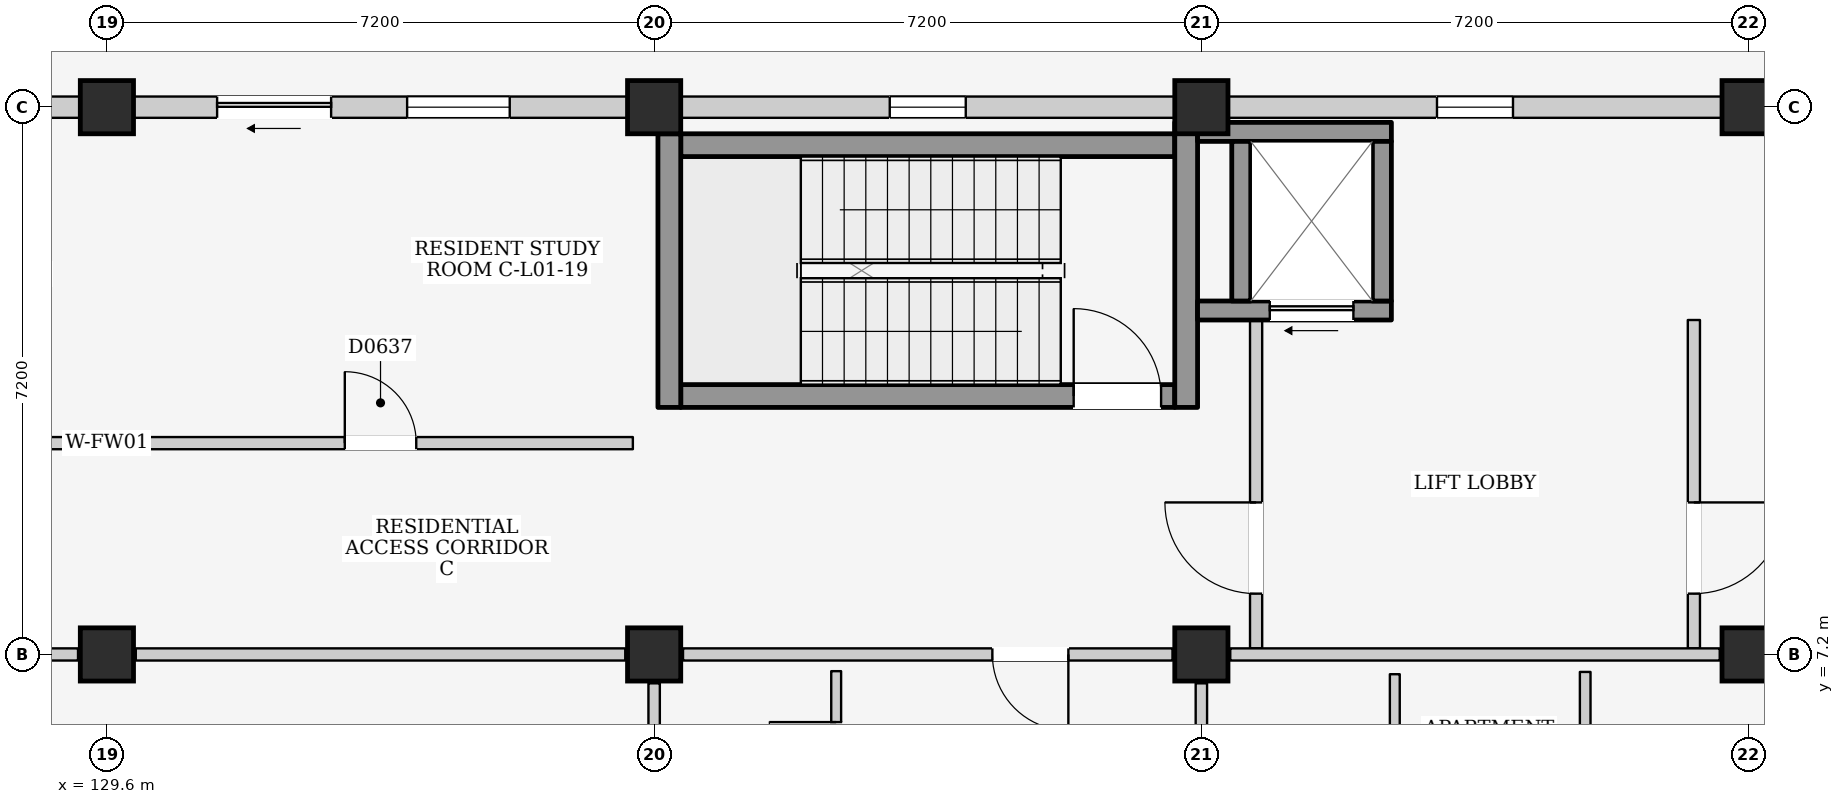
"""IFC4 building model, lengths in metres.
Left out: names, types, materials, properties, quantities, classifications, styles, units other than length and angle.
Written with IfcOpenShell. Run it as: python <this file> out.ifc"""

import sys

from ifc_helpers import new_model, si_unit, direction, frame, frame_2d, origin, origin_2d, place, context, subcontext, project, spatial, rectangle, extrude, element, fill, save


model = new_model("IFC4")
c1 = context("Model", 3, precision=1e-05, world=origin(), true_north=direction((0.0, 1.0)))
c2 = subcontext(c1, "Body", "Model", "MODEL_VIEW")
j1 = project(units=[si_unit("LENGTHUNIT", "METRE"), si_unit("PLANEANGLEUNIT", "RADIAN")], contexts=[c1])
p1 = place(None, origin())
s1 = spatial("IfcSite", under=j1, at=p1, CompositionType="ELEMENT")
p2 = place(p1, origin())
s2 = spatial("IfcBuilding", under=s1, at=p2, CompositionType="ELEMENT")
p3 = place(p2, frame((0.0, 0.0, 4.5)))
s3 = spatial("IfcBuildingStorey", under=s2, at=p3, CompositionType="ELEMENT", Elevation=4.5)
for number, where, z_axis, x_axis in (
    (1, (129.6, 7.2, 0.0), (0.0, 0.0, 1.0), (1.0, 0.0, 0.0)),
    (2, (129.6, 14.4, 0.0), (0.0, 0.0, 1.0), (1.0, 0.0, 0.0)),
    (3, (136.8, 7.2, 0.0), (0.0, 0.0, 1.0), (1.0, 0.0, 0.0)),
    (4, (136.8, 14.4, 0.0), (0.0, 0.0, 1.0), (1.0, 0.0, 0.0)),
    (5, (144.0, 7.2, 0.0), (0.0, 0.0, 1.0), (1.0, 0.0, 0.0)),
    (6, (144.0, 14.4, 0.0), (0.0, 0.0, 1.0), (1.0, 0.0, 0.0)),
    (7, (151.2, 7.2, 0.0), (0.0, 0.0, 1.0), (1.0, 0.0, 0.0)),
    (8, (151.2, 14.4, 0.0), (0.0, 0.0, 1.0), (1.0, 0.0, 0.0)),
):
    element("IfcColumn", number, at=place(p3, frame(where, z_axis=z_axis, x_axis=x_axis)), inside=s3, PredefinedType="COLUMN", context=c2, shape_type="SweptSolid", body=[
        extrude(rectangle(XDim=0.7, YDim=0.7, at=origin_2d()), origin(), (0.0, 0.0, 1.0), 4.5),
    ])
p4 = place(p3, frame((122.75, 14.4, 0.0), z_axis=(0.0, 0.0, 1.0), x_axis=(1.0, 0.0, 0.0)))
e9 = element("IfcWall", 9, at=p4, inside=s3, PredefinedType="ELEMENTEDWALL", context=c2, shape_type="SweptSolid", body=[
    extrude(rectangle(XDim=6.5, YDim=0.28, at=frame_2d((3.25, 0.0))), origin(), (0.0, 0.0, 1.0), 3.635),
])
p5 = place(p4, frame((1.1, 0.0, 0.0)))
e10 = element("IfcOpeningElement", 10, at=p5, cuts=e9, PredefinedType="OPENING", context=c2, shape_type="SweptSolid", body=[
    extrude(rectangle(XDim=1.5, YDim=2.12, at=frame_2d((0.75, 1.06))), frame((0.0, 0.155, 0.0), z_axis=(0.0, -1.0, 0.0), x_axis=(1.0, 0.0, 0.0)), (0.0, 0.0, 1.0), 0.31),
])
p6 = place(p4, frame((3.6, 0.0, 0.95)))
e11 = element("IfcOpeningElement", 11, at=p6, cuts=e9, PredefinedType="OPENING", context=c2, shape_type="SweptSolid", body=[
    extrude(rectangle(XDim=1.35, YDim=1.5, at=frame_2d((0.675, 0.75))), frame((0.0, 0.155, 0.0), z_axis=(0.0, -1.0, 0.0), x_axis=(1.0, 0.0, 0.0)), (0.0, 0.0, 1.0), 0.31),
])
p7 = place(p3, frame((129.95, 14.4, 0.0), z_axis=(0.0, 0.0, 1.0), x_axis=(1.0, 0.0, 0.0)))
e12 = element("IfcWall", 12, at=p7, inside=s3, PredefinedType="ELEMENTEDWALL", context=c2, shape_type="SweptSolid", body=[
    extrude(rectangle(XDim=6.5, YDim=0.28, at=frame_2d((3.25, 0.0))), origin(), (0.0, 0.0, 1.0), 3.635),
])
p8 = place(p7, frame((1.1, 0.0, 0.0)))
e13 = element("IfcOpeningElement", 13, at=p8, cuts=e12, PredefinedType="OPENING", context=c2, shape_type="SweptSolid", body=[
    extrude(rectangle(XDim=1.5, YDim=2.12, at=frame_2d((0.75, 1.06))), frame((0.0, 0.155, 0.0), z_axis=(0.0, -1.0, 0.0), x_axis=(1.0, 0.0, 0.0)), (0.0, 0.0, 1.0), 0.31),
])
p9 = place(p7, frame((3.6, 0.0, 0.95)))
e14 = element("IfcOpeningElement", 14, at=p9, cuts=e12, PredefinedType="OPENING", context=c2, shape_type="SweptSolid", body=[
    extrude(rectangle(XDim=1.35, YDim=1.5, at=frame_2d((0.675, 0.75))), frame((0.0, 0.155, 0.0), z_axis=(0.0, -1.0, 0.0), x_axis=(1.0, 0.0, 0.0)), (0.0, 0.0, 1.0), 0.31),
])
p10 = place(p3, frame((137.15, 14.4, 0.0), z_axis=(0.0, 0.0, 1.0), x_axis=(1.0, 0.0, 0.0)))
e15 = element("IfcWall", 15, at=p10, inside=s3, PredefinedType="ELEMENTEDWALL", context=c2, shape_type="SweptSolid", body=[
    extrude(rectangle(XDim=6.5, YDim=0.28, at=frame_2d((3.25, 0.0))), origin(), (0.0, 0.0, 1.0), 3.635),
])
p11 = place(p10, frame((2.75, 0.0, 1.2)))
e16 = element("IfcOpeningElement", 16, at=p11, cuts=e15, PredefinedType="OPENING", context=c2, shape_type="SweptSolid", body=[
    extrude(rectangle(XDim=1.0, YDim=0.9, at=frame_2d((0.5, 0.45))), frame((0.0, 0.155, 0.0), z_axis=(0.0, -1.0, 0.0), x_axis=(1.0, 0.0, 0.0)), (0.0, 0.0, 1.0), 0.31),
])
p12 = place(p3, frame((144.35, 14.4, 0.0), z_axis=(0.0, 0.0, 1.0), x_axis=(1.0, 0.0, 0.0)))
e17 = element("IfcWall", 17, at=p12, inside=s3, PredefinedType="ELEMENTEDWALL", context=c2, shape_type="SweptSolid", body=[
    extrude(rectangle(XDim=6.5, YDim=0.28, at=frame_2d((3.25, 0.0))), origin(), (0.0, 0.0, 1.0), 3.635),
])
p13 = place(p12, frame((2.75, 0.0, 1.2)))
e18 = element("IfcOpeningElement", 18, at=p13, cuts=e17, PredefinedType="OPENING", context=c2, shape_type="SweptSolid", body=[
    extrude(rectangle(XDim=1.0, YDim=0.9, at=frame_2d((0.5, 0.45))), frame((0.0, 0.155, 0.0), z_axis=(0.0, -1.0, 0.0), x_axis=(1.0, 0.0, 0.0)), (0.0, 0.0, 1.0), 0.31),
])
p14 = place(p3, frame((137.15, 10.6, 0.0), z_axis=(0.0, 0.0, 1.0), x_axis=(1.0, 0.0, 0.0)))
e19 = element("IfcWall", 19, at=p14, inside=s3, PredefinedType="SHEAR", context=c2, shape_type="SweptSolid", body=[
    extrude(rectangle(XDim=6.5, YDim=0.3, at=frame_2d((3.25, 0.0))), origin(), (0.0, 0.0, 1.0), 4.25),
])
p15 = place(p14, frame((5.17, 0.0, 0.0)))
e20 = element("IfcOpeningElement", 20, at=p15, cuts=e19, PredefinedType="OPENING", context=c2, shape_type="SweptSolid", body=[
    extrude(rectangle(XDim=1.15, YDim=2.2, at=frame_2d((0.575, 1.1))), frame((0.0, 0.165, 0.0), z_axis=(0.0, -1.0, 0.0), x_axis=(1.0, 0.0, 0.0)), (0.0, 0.0, 1.0), 0.33),
])
p16 = place(p3, frame((137.15, 13.9, 0.0), z_axis=(0.0, 0.0, 1.0), x_axis=(1.0, 0.0, 0.0)))
e21 = element("IfcWall", 21, at=p16, inside=s3, PredefinedType="SHEAR", context=c2, shape_type="SweptSolid", body=[
    extrude(rectangle(XDim=6.5, YDim=0.3, at=frame_2d((3.25, 0.0))), origin(), (0.0, 0.0, 1.0), 4.25),
])
p17 = place(p3, frame((137.0, 10.45, 0.0), z_axis=(0.0, 0.0, 1.0), x_axis=(0.0, 1.0, 0.0)))
e22 = element("IfcWall", 22, at=p17, inside=s3, PredefinedType="SHEAR", context=c2, shape_type="SweptSolid", body=[
    extrude(rectangle(XDim=3.6, YDim=0.3, at=frame_2d((1.8, 0.0))), origin(), (0.0, 0.0, 1.0), 4.25),
])
p18 = place(p3, frame((143.8, 10.45, 0.0), z_axis=(0.0, 0.0, 1.0), x_axis=(0.0, 1.0, 0.0)))
e23 = element("IfcWall", 23, at=p18, inside=s3, PredefinedType="SHEAR", context=c2, shape_type="SweptSolid", body=[
    extrude(rectangle(XDim=3.75, YDim=0.3, at=frame_2d((1.875, 0.0))), origin(), (0.0, 0.0, 1.0), 4.25),
])
p19 = place(p3, frame((144.72, 7.28, 0.0), z_axis=(0.0, 0.0, 1.0), x_axis=(0.0, 1.0, 0.0)))
e24 = element("IfcWall", 24, at=p19, inside=s3, PredefinedType="PARTITIONING", context=c2, shape_type="SweptSolid", body=[
    extrude(rectangle(XDim=4.32, YDim=0.16, at=frame_2d((2.16, 0.0))), origin(), (0.0, 0.0, 1.0), 4.25),
])
p20 = place(p19, frame((0.72, 0.0, 0.0)))
e25 = element("IfcOpeningElement", 25, at=p20, cuts=e24, PredefinedType="OPENING", context=c2, shape_type="SweptSolid", body=[
    extrude(rectangle(XDim=1.2, YDim=2.2, at=frame_2d((0.6, 1.1))), frame((0.0, 0.095, 0.0), z_axis=(0.0, -1.0, 0.0), x_axis=(1.0, 0.0, 0.0)), (0.0, 0.0, 1.0), 0.19),
])
p21 = place(p3, frame((150.48, 7.28, 0.0), z_axis=(0.0, 0.0, 1.0), x_axis=(0.0, 1.0, 0.0)))
e26 = element("IfcWall", 26, at=p21, inside=s3, PredefinedType="PARTITIONING", context=c2, shape_type="SweptSolid", body=[
    extrude(rectangle(XDim=4.32, YDim=0.16, at=frame_2d((2.16, 0.0))), origin(), (0.0, 0.0, 1.0), 4.25),
])
p22 = place(p21, frame((0.72, 0.0, 0.0)))
e27 = element("IfcOpeningElement", 27, at=p22, cuts=e26, PredefinedType="OPENING", context=c2, shape_type="SweptSolid", body=[
    extrude(rectangle(XDim=1.2, YDim=2.2, at=frame_2d((0.6, 1.1))), frame((0.0, 0.095, 0.0), z_axis=(0.0, -1.0, 0.0), x_axis=(1.0, 0.0, 0.0)), (0.0, 0.0, 1.0), 0.19),
])
p23 = place(p3, frame((143.95, 11.725, 0.0), z_axis=(0.0, 0.0, 1.0), x_axis=(1.0, 0.0, 0.0)))
e28 = element("IfcWall", 28, at=p23, inside=s3, PredefinedType="SHEAR", context=c2, shape_type="SweptSolid", body=[
    extrude(rectangle(XDim=2.55, YDim=0.25, at=frame_2d((1.275, 0.0))), origin(), (0.0, 0.0, 1.0), 4.25),
])
p24 = place(p23, frame((0.95, 0.0, 0.0)))
e29 = element("IfcOpeningElement", 29, at=p24, cuts=e28, PredefinedType="OPENING", context=c2, shape_type="SweptSolid", body=[
    extrude(rectangle(XDim=1.1, YDim=2.15, at=frame_2d((0.55, 1.075))), frame((0.0, 0.14, 0.0), z_axis=(0.0, -1.0, 0.0), x_axis=(1.0, 0.0, 0.0)), (0.0, 0.0, 1.0), 0.28),
])
p25 = place(p3, frame((143.95, 14.075, 0.0), z_axis=(0.0, 0.0, 1.0), x_axis=(1.0, 0.0, 0.0)))
e30 = element("IfcWall", 30, at=p25, inside=s3, PredefinedType="SHEAR", context=c2, shape_type="SweptSolid", body=[
    extrude(rectangle(XDim=2.55, YDim=0.25, at=frame_2d((1.275, 0.0))), origin(), (0.0, 0.0, 1.0), 4.25),
])
for number, where, z_axis, x_axis in (
    (31, (144.525, 11.85, 0.0), (0.0, 0.0, 1.0), (0.0, 1.0, 0.0)),
    (32, (146.375, 11.85, 0.0), (0.0, 0.0, 1.0), (0.0, 1.0, 0.0)),
):
    element("IfcWall", number, at=place(p3, frame(where, z_axis=z_axis, x_axis=x_axis)), inside=s3, PredefinedType="SHEAR", context=c2, shape_type="SweptSolid", body=[
        extrude(rectangle(XDim=2.1, YDim=0.25, at=frame_2d((1.05, 0.0))), origin(), (0.0, 0.0, 1.0), 4.25),
    ])
p26 = place(p3, frame((122.78, 7.2, 0.0), z_axis=(0.0, 0.0, 1.0), x_axis=(1.0, 0.0, 0.0)))
e33 = element("IfcWall", 33, at=p26, inside=s3, PredefinedType="PARTITIONING", context=c2, shape_type="SweptSolid", body=[
    extrude(rectangle(XDim=6.44, YDim=0.16, at=frame_2d((3.22, 0.0))), origin(), (0.0, 0.0, 1.0), 3.635),
])
p27 = place(p26, frame((4.045, 0.0, 0.0)))
e34 = element("IfcOpeningElement", 34, at=p27, cuts=e33, PredefinedType="OPENING", context=c2, shape_type="SweptSolid", body=[
    extrude(rectangle(XDim=1.05, YDim=2.2, at=frame_2d((0.525, 1.1))), frame((0.0, 0.095, 0.0), z_axis=(0.0, -1.0, 0.0), x_axis=(1.0, 0.0, 0.0)), (0.0, 0.0, 1.0), 0.19),
])
p28 = place(p3, frame((129.98, 7.2, 0.0), z_axis=(0.0, 0.0, 1.0), x_axis=(1.0, 0.0, 0.0)))
e35 = element("IfcWall", 35, at=p28, inside=s3, PredefinedType="PARTITIONING", context=c2, shape_type="SweptSolid", body=[
    extrude(rectangle(XDim=6.44, YDim=0.16, at=frame_2d((3.22, 0.0))), origin(), (0.0, 0.0, 1.0), 3.635),
])
p29 = place(p3, frame((136.8, 0.38, 0.0), z_axis=(0.0, 0.0, 1.0), x_axis=(0.0, 1.0, 0.0)))
e36 = element("IfcWall", 36, at=p29, inside=s3, PredefinedType="PARTITIONING", context=c2, shape_type="SweptSolid", body=[
    extrude(rectangle(XDim=6.44, YDim=0.15, at=frame_2d((3.22, 0.0))), origin(), (0.0, 0.0, 1.0), 3.685),
])
p30 = place(p3, frame((137.18, 7.2, 0.0), z_axis=(0.0, 0.0, 1.0), x_axis=(1.0, 0.0, 0.0)))
e37 = element("IfcWall", 37, at=p30, inside=s3, PredefinedType="PARTITIONING", context=c2, shape_type="SweptSolid", body=[
    extrude(rectangle(XDim=6.44, YDim=0.16, at=frame_2d((3.22, 0.0))), origin(), (0.0, 0.0, 1.0), 3.635),
])
p31 = place(p30, frame((4.07, 0.0, 0.0)))
e38 = element("IfcOpeningElement", 38, at=p31, cuts=e37, PredefinedType="OPENING", context=c2, shape_type="SweptSolid", body=[
    extrude(rectangle(XDim=1.0, YDim=2.15, at=frame_2d((0.5, 1.075))), frame((0.0, 0.095, 0.0), z_axis=(0.0, -1.0, 0.0), x_axis=(1.0, 0.0, 0.0)), (0.0, 0.0, 1.0), 0.19),
])
p32 = place(p3, frame((144.0, 0.38, 0.0), z_axis=(0.0, 0.0, 1.0), x_axis=(0.0, 1.0, 0.0)))
e39 = element("IfcWall", 39, at=p32, inside=s3, PredefinedType="PARTITIONING", context=c2, shape_type="SweptSolid", body=[
    extrude(rectangle(XDim=6.44, YDim=0.15, at=frame_2d((3.22, 0.0))), origin(), (0.0, 0.0, 1.0), 3.685),
])
p33 = place(p3, frame((139.195, 4.76, 0.0), z_axis=(0.0, 0.0, 1.0), x_axis=(0.0, 1.0, 0.0)))
e40 = element("IfcWall", 40, at=p33, inside=s3, PredefinedType="PARTITIONING", context=c2, shape_type="SweptSolid", body=[
    extrude(rectangle(XDim=2.22, YDim=0.13, at=frame_2d((1.11, 0.0))), origin(), (0.0, 0.0, 1.0), 4.25),
])
p34 = place(p33, frame((0.67, 0.0, 0.0)))
e41 = element("IfcOpeningElement", 41, at=p34, cuts=e40, PredefinedType="OPENING", context=c2, shape_type="SweptSolid", body=[
    extrude(rectangle(XDim=0.88, YDim=2.1, at=frame_2d((0.44, 1.05))), frame((0.0, 0.08, 0.0), z_axis=(0.0, -1.0, 0.0), x_axis=(1.0, 0.0, 0.0)), (0.0, 0.0, 1.0), 0.16),
])
p35 = place(p3, frame((144.38, 7.2, 0.0), z_axis=(0.0, 0.0, 1.0), x_axis=(1.0, 0.0, 0.0)))
e42 = element("IfcWall", 42, at=p35, inside=s3, PredefinedType="PARTITIONING", context=c2, shape_type="SweptSolid", body=[
    extrude(rectangle(XDim=6.44, YDim=0.16, at=frame_2d((3.22, 0.0))), origin(), (0.0, 0.0, 1.0), 3.635),
])
p36 = place(p3, frame((146.545, 3.9, 0.0), z_axis=(0.0, 0.0, 1.0), x_axis=(0.0, 1.0, 0.0)))
e43 = element("IfcWall", 43, at=p36, inside=s3, PredefinedType="PARTITIONING", context=c2, shape_type="SweptSolid", body=[
    extrude(rectangle(XDim=3.04, YDim=0.13, at=frame_2d((1.52, 0.0))), origin(), (0.0, 0.0, 1.0), 4.25),
])
p37 = place(p3, frame((149.05, 3.91, 0.0), z_axis=(0.0, 0.0, 1.0), x_axis=(0.0, 1.0, 0.0)))
e44 = element("IfcWall", 44, at=p37, inside=s3, PredefinedType="PARTITIONING", context=c2, shape_type="SweptSolid", body=[
    extrude(rectangle(XDim=3.06, YDim=0.14, at=frame_2d((1.53, 0.0))), origin(), (0.0, 0.0, 1.0), 4.25),
])
p38 = place(p3, frame((122.68, 9.98, 0.0), z_axis=(0.0, 0.0, 1.0), x_axis=(1.0, 0.0, 0.0)))
e45 = element("IfcWall", 45, at=p38, inside=s3, PredefinedType="PARTITIONING", context=c2, shape_type="SweptSolid", body=[
    extrude(rectangle(XDim=6.64, YDim=0.16, at=frame_2d((3.32, 0.0))), origin(), (0.0, 0.0, 1.0), 4.25),
])
p39 = place(p38, frame((2.85, 0.0, 0.0)))
e46 = element("IfcOpeningElement", 46, at=p39, cuts=e45, PredefinedType="OPENING", context=c2, shape_type="SweptSolid", body=[
    extrude(rectangle(XDim=0.94, YDim=2.12, at=frame_2d((0.47, 1.06))), frame((0.0, 0.095, 0.0), z_axis=(0.0, -1.0, 0.0), x_axis=(1.0, 0.0, 0.0)), (0.0, 0.0, 1.0), 0.19),
])
p40 = place(p3, frame((129.88, 9.98, 0.0), z_axis=(0.0, 0.0, 1.0), x_axis=(1.0, 0.0, 0.0)))
e47 = element("IfcWall", 47, at=p40, inside=s3, PredefinedType="PARTITIONING", context=c2, shape_type="SweptSolid", body=[
    extrude(rectangle(XDim=6.64, YDim=0.16, at=frame_2d((3.32, 0.0))), origin(), (0.0, 0.0, 1.0), 4.25),
])
p41 = place(p40, frame((2.85, 0.0, 0.0)))
e48 = element("IfcOpeningElement", 48, at=p41, cuts=e47, PredefinedType="OPENING", context=c2, shape_type="SweptSolid", body=[
    extrude(rectangle(XDim=0.94, YDim=2.12, at=frame_2d((0.47, 1.06))), frame((0.0, 0.095, 0.0), z_axis=(0.0, -1.0, 0.0), x_axis=(1.0, 0.0, 0.0)), (0.0, 0.0, 1.0), 0.19),
])
p42 = place(p8, frame((1.5, 0.0, 0.0), z_axis=(0.0, 0.0, 1.0), x_axis=(-1.0, 0.0, 0.0)))
e49 = element("IfcDoor", 49, at=p42, inside=s3, OperationType="SLIDING_TO_LEFT", PredefinedType="DOOR", context=c2, shape_type="SweptSolid", body=[
    extrude(rectangle(XDim=1.5, YDim=2.12, at=frame_2d((0.75, 1.06))), frame((0.0, 0.025, 0.0), z_axis=(0.0, -1.0, 0.0), x_axis=(1.0, 0.0, 0.0)), (0.0, 0.0, 1.0), 0.05),
])
fill(e13, e49)
p43 = place(p9, origin())
e50 = element("IfcWindow", 50, at=p43, inside=s3, PartitioningType="SINGLE_PANEL", PredefinedType="WINDOW", context=c2, shape_type="SweptSolid", body=[
    extrude(rectangle(XDim=1.35, YDim=1.5, at=frame_2d((0.675, 0.75))), frame((0.0, 0.03, 0.0), z_axis=(0.0, -1.0, 0.0), x_axis=(1.0, 0.0, 0.0)), (0.0, 0.0, 1.0), 0.06),
])
fill(e14, e50)
p44 = place(p11, origin())
e51 = element("IfcWindow", 51, at=p44, inside=s3, PartitioningType="SINGLE_PANEL", PredefinedType="WINDOW", context=c2, shape_type="SweptSolid", body=[
    extrude(rectangle(XDim=1.0, YDim=0.9, at=frame_2d((0.5, 0.45))), frame((0.0, 0.03, 0.0), z_axis=(0.0, -1.0, 0.0), x_axis=(1.0, 0.0, 0.0)), (0.0, 0.0, 1.0), 0.06),
])
fill(e16, e51)
p45 = place(p13, origin())
e52 = element("IfcWindow", 52, at=p45, inside=s3, PartitioningType="SINGLE_PANEL", PredefinedType="WINDOW", context=c2, shape_type="SweptSolid", body=[
    extrude(rectangle(XDim=1.0, YDim=0.9, at=frame_2d((0.5, 0.45))), frame((0.0, 0.03, 0.0), z_axis=(0.0, -1.0, 0.0), x_axis=(1.0, 0.0, 0.0)), (0.0, 0.0, 1.0), 0.06),
])
fill(e18, e52)
p46 = place(p15, origin())
e53 = element("IfcDoor", 53, at=p46, inside=s3, OperationType="SINGLE_SWING_LEFT", PredefinedType="DOOR", context=c2, shape_type="SweptSolid", body=[
    extrude(rectangle(XDim=1.15, YDim=2.2, at=frame_2d((0.575, 1.1))), frame((0.0, 0.025, 0.0), z_axis=(0.0, -1.0, 0.0), x_axis=(1.0, 0.0, 0.0)), (0.0, 0.0, 1.0), 0.05),
])
fill(e20, e53)
p47 = place(p20, origin())
e54 = element("IfcDoor", 54, at=p47, inside=s3, OperationType="SINGLE_SWING_RIGHT", PredefinedType="DOOR", context=c2, shape_type="SweptSolid", body=[
    extrude(rectangle(XDim=1.2, YDim=2.2, at=frame_2d((0.6, 1.1))), frame((0.0, 0.025, 0.0), z_axis=(0.0, -1.0, 0.0), x_axis=(1.0, 0.0, 0.0)), (0.0, 0.0, 1.0), 0.05),
])
fill(e25, e54)
p48 = place(p22, frame((1.2, 0.0, 0.0), z_axis=(0.0, 0.0, 1.0), x_axis=(-1.0, 0.0, 0.0)))
e55 = element("IfcDoor", 55, at=p48, inside=s3, OperationType="SINGLE_SWING_LEFT", PredefinedType="DOOR", context=c2, shape_type="SweptSolid", body=[
    extrude(rectangle(XDim=1.2, YDim=2.2, at=frame_2d((0.6, 1.1))), frame((0.0, 0.025, 0.0), z_axis=(0.0, -1.0, 0.0), x_axis=(1.0, 0.0, 0.0)), (0.0, 0.0, 1.0), 0.05),
])
fill(e27, e55)
p49 = place(p24, frame((1.1, 0.0, 0.0), z_axis=(0.0, 0.0, 1.0), x_axis=(-1.0, 0.0, 0.0)))
e56 = element("IfcDoor", 56, at=p49, inside=s3, OperationType="SLIDING_TO_LEFT", PredefinedType="DOOR", context=c2, shape_type="SweptSolid", body=[
    extrude(rectangle(XDim=1.1, YDim=2.15, at=frame_2d((0.55, 1.075))), frame((0.0, 0.025, 0.0), z_axis=(0.0, -1.0, 0.0), x_axis=(1.0, 0.0, 0.0)), (0.0, 0.0, 1.0), 0.05),
])
fill(e29, e56)
p50 = place(p31, frame((1.0, 0.0, 0.0), z_axis=(0.0, 0.0, 1.0), x_axis=(-1.0, 0.0, 0.0)))
e57 = element("IfcDoor", 57, at=p50, inside=s3, OperationType="SINGLE_SWING_LEFT", PredefinedType="DOOR", context=c2, shape_type="SweptSolid", body=[
    extrude(rectangle(XDim=1.0, YDim=2.15, at=frame_2d((0.5, 1.075))), frame((0.0, 0.025, 0.0), z_axis=(0.0, -1.0, 0.0), x_axis=(1.0, 0.0, 0.0)), (0.0, 0.0, 1.0), 0.05),
])
fill(e38, e57)
p51 = place(p34, origin())
e58 = element("IfcDoor", 58, at=p51, inside=s3, OperationType="SINGLE_SWING_RIGHT", PredefinedType="DOOR", context=c2, shape_type="SweptSolid", body=[
    extrude(rectangle(XDim=0.88, YDim=2.1, at=frame_2d((0.44, 1.05))), frame((0.0, 0.025, 0.0), z_axis=(0.0, -1.0, 0.0), x_axis=(1.0, 0.0, 0.0)), (0.0, 0.0, 1.0), 0.05),
])
fill(e41, e58)
p52 = place(p41, origin())
e59 = element("IfcDoor", 59, at=p52, inside=s3, OperationType="SINGLE_SWING_LEFT", PredefinedType="DOOR", context=c2, shape_type="SweptSolid", body=[
    extrude(rectangle(XDim=0.94, YDim=2.12, at=frame_2d((0.47, 1.06))), frame((0.0, 0.025, 0.0), z_axis=(0.0, -1.0, 0.0), x_axis=(1.0, 0.0, 0.0)), (0.0, 0.0, 1.0), 0.05),
])
fill(e48, e59)
save(model, sys.argv[1])
